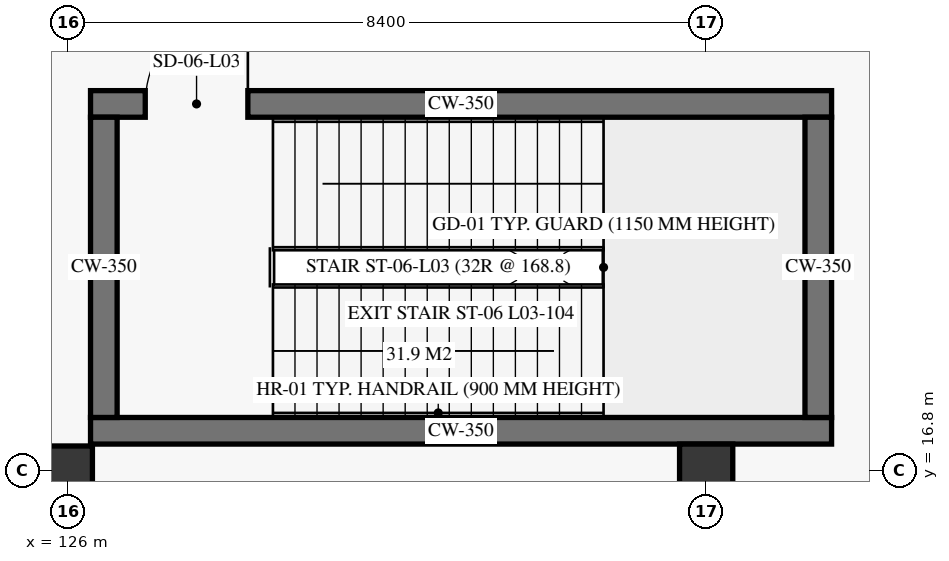
"""IFC4 building model, lengths in metres.
Left out: names, types, materials, properties, quantities, classifications, styles, units other than length and angle.
Written with IfcOpenShell. Run it as: python <this file> out.ifc"""

import sys

from ifc_helpers import new_model, si_unit, direction, frame, frame_2d, origin, origin_2d, place, context, subcontext, project, spatial, rectangle, extrude, element, fill, save


model = new_model("IFC4")
c1 = context("Model", 3, precision=1e-05, world=origin(), true_north=direction((0.0, 1.0)))
c2 = subcontext(c1, "Body", "Model", "MODEL_VIEW")
j1 = project(units=[si_unit("LENGTHUNIT", "METRE"), si_unit("PLANEANGLEUNIT", "RADIAN")], contexts=[c1])
p1 = place(None, origin())
s1 = spatial("IfcSite", under=j1, at=p1, CompositionType="ELEMENT")
p2 = place(p1, origin())
s2 = spatial("IfcBuilding", under=s1, at=p2, CompositionType="ELEMENT")
p3 = place(p2, frame((0.0, 0.0, 11.4)))
s3 = spatial("IfcBuildingStorey", under=s2, at=p3, CompositionType="ELEMENT", Elevation=11.4)
p4 = place(p3, frame((126.0, 16.8, 0.0), z_axis=(0.0, 0.0, 1.0), x_axis=(1.0, 0.0, 0.0)))
e1 = element("IfcColumn", 1, at=p4, inside=s3, PredefinedType="COLUMN", context=c2, shape_type="SweptSolid", body=[
    extrude(rectangle(XDim=0.65, YDim=0.65, at=origin_2d()), origin(), (0.0, 0.0, 1.0), 5.1),
])
p5 = place(p3, frame((134.4, 16.8, 0.0), z_axis=(0.0, 0.0, 1.0), x_axis=(1.0, 0.0, 0.0)))
e2 = element("IfcColumn", 2, at=p5, inside=s3, PredefinedType="COLUMN", context=c2, shape_type="SweptSolid", body=[
    extrude(rectangle(XDim=0.7, YDim=0.7, at=origin_2d()), origin(), (0.0, 0.0, 1.0), 5.1),
])
p6 = place(p3, frame((126.3, 17.325, 0.0), z_axis=(0.0, 0.0, 1.0), x_axis=(1.0, 0.0, 0.0)))
e3 = element("IfcWall", 3, at=p6, inside=s3, PredefinedType="SHEAR", context=c2, shape_type="SweptSolid", body=[
    extrude(rectangle(XDim=9.75, YDim=0.35, at=frame_2d((4.875, 0.0))), origin(), (0.0, 0.0, 1.0), 5.1),
])
p7 = place(p3, frame((126.3, 21.625, 0.0), z_axis=(0.0, 0.0, 1.0), x_axis=(1.0, 0.0, 0.0)))
e4 = element("IfcWall", 4, at=p7, inside=s3, PredefinedType="SHEAR", context=c2, shape_type="SweptSolid", body=[
    extrude(rectangle(XDim=9.75, YDim=0.35, at=frame_2d((4.875, 0.0))), origin(), (0.0, 0.0, 1.0), 5.1),
])
p8 = place(p7, frame((0.72, 0.0, 0.0)))
e5 = element("IfcOpeningElement", 5, at=p8, cuts=e4, PredefinedType="OPENING", context=c2, shape_type="SweptSolid", body=[
    extrude(rectangle(XDim=1.35, YDim=2.25, at=frame_2d((0.675, 1.125))), frame((0.0, 0.185, 0.0), z_axis=(0.0, -1.0, 0.0), x_axis=(1.0, 0.0, 0.0)), (0.0, 0.0, 1.0), 0.37),
])
for number, where, z_axis, x_axis in (
    (6, (126.475, 17.5, 0.0), (0.0, 0.0, 1.0), (0.0, 1.0, 0.0)),
    (7, (135.875, 17.5, 0.0), (0.0, 0.0, 1.0), (0.0, 1.0, 0.0)),
):
    element("IfcWall", number, at=place(p3, frame(where, z_axis=z_axis, x_axis=x_axis)), inside=s3, PredefinedType="SHEAR", context=c2, shape_type="SweptSolid", body=[
        extrude(rectangle(XDim=3.95, YDim=0.35, at=frame_2d((1.975, 0.0))), origin(), (0.0, 0.0, 1.0), 5.1),
    ])
p9 = place(p8, origin())
e8 = element("IfcDoor", 8, at=p9, inside=s3, OperationType="SINGLE_SWING_RIGHT", PredefinedType="DOOR", context=c2, shape_type="SweptSolid", body=[
    extrude(rectangle(XDim=1.35, YDim=2.25, at=frame_2d((0.675, 1.125))), frame((0.0, 0.025, 0.0), z_axis=(0.0, -1.0, 0.0), x_axis=(1.0, 0.0, 0.0)), (0.0, 0.0, 1.0), 0.05),
])
fill(e5, e8)
save(model, sys.argv[1])
